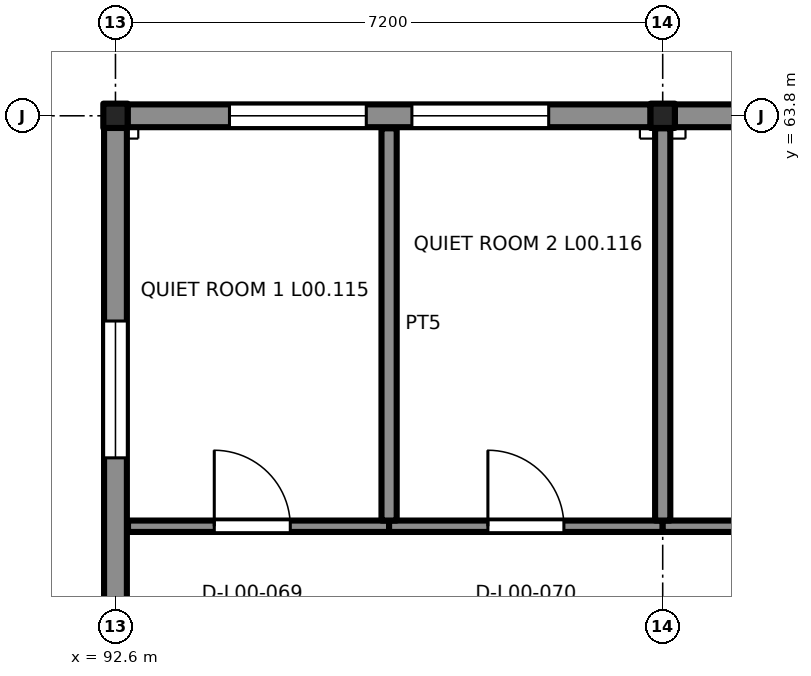
"""IFC4 building model, lengths in metres.
Left out: names, types, materials, properties, quantities, classifications, styles, units other than length and angle.
Written with IfcOpenShell. Run it as: python <this file> out.ifc"""

import sys

from ifc_helpers import new_model, si_unit, direction, frame, frame_2d, origin, origin_2d, place, context, subcontext, project, spatial, rectangle, extrude, element, fill, save


model = new_model("IFC4")
c1 = context("Model", 3, precision=1e-05, world=origin(), true_north=direction((0.0, 1.0)))
c2 = subcontext(c1, "Body", "Model", "MODEL_VIEW")
j1 = project(units=[si_unit("LENGTHUNIT", "METRE"), si_unit("PLANEANGLEUNIT", "RADIAN")], contexts=[c1])
p1 = place(None, origin())
s1 = spatial("IfcSite", under=j1, at=p1, CompositionType="ELEMENT")
p2 = place(p1, origin())
s2 = spatial("IfcBuilding", under=s1, at=p2, CompositionType="ELEMENT")
p3 = place(p2, origin())
s3 = spatial("IfcBuildingStorey", under=s2, at=p3, CompositionType="ELEMENT", Elevation=0.0)
for number, where, z_axis, x_axis in (
    (1, (92.6, 63.8, -0.2), (0.0, 0.0, 1.0), (1.0, 0.0, 0.0)),
    (2, (99.8, 63.8, -0.2), (0.0, 0.0, 1.0), (1.0, 0.0, 0.0)),
):
    element("IfcColumn", number, at=place(p3, frame(where, z_axis=z_axis, x_axis=x_axis)), inside=s3, PredefinedType="COLUMN", context=c2, shape_type="SweptSolid", body=[
        extrude(rectangle(XDim=0.32, YDim=0.32, at=origin_2d()), origin(), (0.0, 0.0, 1.0), 4.3),
    ])
p4 = place(p3, frame((92.76, 63.8, 0.0), z_axis=(0.0, 0.0, 1.0), x_axis=(1.0, 0.0, 0.0)))
e3 = element("IfcWall", 3, at=p4, inside=s3, PredefinedType="SOLIDWALL", context=c2, shape_type="SweptSolid", body=[
    extrude(rectangle(XDim=6.88, YDim=0.33, at=frame_2d((3.44, 0.0))), origin(), (0.0, 0.0, 1.0), 0.45),
])
p5 = place(p3, frame((92.76, 63.8, 0.45), z_axis=(0.0, 0.0, 1.0), x_axis=(1.0, 0.0, 0.0)))
e4 = element("IfcWall", 4, at=p5, inside=s3, PredefinedType="PARTITIONING", context=c2, shape_type="SweptSolid", body=[
    extrude(rectangle(XDim=6.88, YDim=0.3, at=frame_2d((3.44, 0.0))), origin(), (0.0, 0.0, 1.0), 3.35),
])
p6 = place(p5, frame((1.34, 0.0, 0.45)))
e5 = element("IfcOpeningElement", 5, at=p6, cuts=e4, PredefinedType="OPENING", context=c2, shape_type="SweptSolid", body=[
    extrude(rectangle(XDim=1.8, YDim=2.1, at=frame_2d((0.9, 1.05))), frame((0.0, 0.16, 0.0), z_axis=(0.0, -1.0, 0.0), x_axis=(1.0, 0.0, 0.0)), (0.0, 0.0, 1.0), 0.32),
])
p7 = place(p5, frame((3.74, 0.0, 0.45)))
e6 = element("IfcOpeningElement", 6, at=p7, cuts=e4, PredefinedType="OPENING", context=c2, shape_type="SweptSolid", body=[
    extrude(rectangle(XDim=1.8, YDim=2.1, at=frame_2d((0.9, 1.05))), frame((0.0, 0.16, 0.0), z_axis=(0.0, -1.0, 0.0), x_axis=(1.0, 0.0, 0.0)), (0.0, 0.0, 1.0), 0.32),
])
p8 = place(p3, frame((99.96, 63.8, 0.0), z_axis=(0.0, 0.0, 1.0), x_axis=(1.0, 0.0, 0.0)))
e7 = element("IfcWall", 7, at=p8, inside=s3, PredefinedType="SOLIDWALL", context=c2, shape_type="SweptSolid", body=[
    extrude(rectangle(XDim=6.88, YDim=0.33, at=frame_2d((3.44, 0.0))), origin(), (0.0, 0.0, 1.0), 0.45),
])
p9 = place(p3, frame((99.96, 63.8, 0.45), z_axis=(0.0, 0.0, 1.0), x_axis=(1.0, 0.0, 0.0)))
e8 = element("IfcWall", 8, at=p9, inside=s3, PredefinedType="PARTITIONING", context=c2, shape_type="SweptSolid", body=[
    extrude(rectangle(XDim=6.88, YDim=0.3, at=frame_2d((3.44, 0.0))), origin(), (0.0, 0.0, 1.0), 3.35),
])
p10 = place(p9, frame((2.54, 0.0, 0.45)))
e9 = element("IfcOpeningElement", 9, at=p10, cuts=e8, PredefinedType="OPENING", context=c2, shape_type="SweptSolid", body=[
    extrude(rectangle(XDim=1.8, YDim=2.1, at=frame_2d((0.9, 1.05))), frame((0.0, 0.16, 0.0), z_axis=(0.0, -1.0, 0.0), x_axis=(1.0, 0.0, 0.0)), (0.0, 0.0, 1.0), 0.32),
])
p11 = place(p3, frame((92.6, 56.76, 0.0), z_axis=(0.0, 0.0, 1.0), x_axis=(0.0, 1.0, 0.0)))
e10 = element("IfcWall", 10, at=p11, inside=s3, PredefinedType="SOLIDWALL", context=c2, shape_type="SweptSolid", body=[
    extrude(rectangle(XDim=6.88, YDim=0.33, at=frame_2d((3.44, 0.0))), origin(), (0.0, 0.0, 1.0), 0.45),
])
p12 = place(p3, frame((92.6, 56.76, 0.45), z_axis=(0.0, 0.0, 1.0), x_axis=(0.0, 1.0, 0.0)))
e11 = element("IfcWall", 11, at=p12, inside=s3, PredefinedType="PARTITIONING", context=c2, shape_type="SweptSolid", body=[
    extrude(rectangle(XDim=6.88, YDim=0.3, at=frame_2d((3.44, 0.0))), origin(), (0.0, 0.0, 1.0), 3.35),
])
p13 = place(p12, frame((2.54, 0.0, 0.45)))
e12 = element("IfcOpeningElement", 12, at=p13, cuts=e11, PredefinedType="OPENING", context=c2, shape_type="SweptSolid", body=[
    extrude(rectangle(XDim=1.8, YDim=2.1, at=frame_2d((0.9, 1.05))), frame((0.0, 0.16, 0.0), z_axis=(0.0, -1.0, 0.0), x_axis=(1.0, 0.0, 0.0)), (0.0, 0.0, 1.0), 0.32),
])
p14 = place(p3, frame((92.765, 58.4, 0.0), z_axis=(0.0, 0.0, 1.0), x_axis=(1.0, 0.0, 0.0)))
e13 = element("IfcWall", 13, at=p14, inside=s3, PredefinedType="PARTITIONING", context=c2, shape_type="SweptSolid", body=[
    extrude(rectangle(XDim=3.435, YDim=0.15, at=frame_2d((1.718, 0.0))), origin(), (0.0, 0.0, 1.0), 4.382),
])
p15 = place(p14, frame((1.135, 0.0, 0.0)))
e14 = element("IfcOpeningElement", 14, at=p15, cuts=e13, PredefinedType="OPENING", context=c2, shape_type="SweptSolid", body=[
    extrude(rectangle(XDim=1.0, YDim=2.1, at=frame_2d((0.5, 1.05))), frame((0.0, 0.085, 0.0), z_axis=(0.0, -1.0, 0.0), x_axis=(1.0, 0.0, 0.0)), (0.0, 0.0, 1.0), 0.17),
])
p16 = place(p3, frame((96.2, 58.4, 0.0), z_axis=(0.0, 0.0, 1.0), x_axis=(1.0, 0.0, 0.0)))
e15 = element("IfcWall", 15, at=p16, inside=s3, PredefinedType="PARTITIONING", context=c2, shape_type="SweptSolid", body=[
    extrude(rectangle(XDim=3.6, YDim=0.15, at=frame_2d((1.8, 0.0))), origin(), (0.0, 0.0, 1.0), 4.382),
])
p17 = place(p16, frame((1.3, 0.0, 0.0)))
e16 = element("IfcOpeningElement", 16, at=p17, cuts=e15, PredefinedType="OPENING", context=c2, shape_type="SweptSolid", body=[
    extrude(rectangle(XDim=1.0, YDim=2.1, at=frame_2d((0.5, 1.05))), frame((0.0, 0.085, 0.0), z_axis=(0.0, -1.0, 0.0), x_axis=(1.0, 0.0, 0.0)), (0.0, 0.0, 1.0), 0.17),
])
p18 = place(p3, frame((96.2, 63.635, 0.0), z_axis=(0.0, 0.0, 1.0), x_axis=(0.0, -1.0, 0.0)))
e17 = element("IfcWall", 17, at=p18, inside=s3, PredefinedType="PARTITIONING", context=c2, shape_type="SweptSolid", body=[
    extrude(rectangle(XDim=5.16, YDim=0.2, at=frame_2d((2.58, 0.0))), origin(), (0.0, 0.0, 1.0), 4.382),
])
p19 = place(p3, frame((99.8, 58.4, 0.0), z_axis=(0.0, 0.0, 1.0), x_axis=(1.0, 0.0, 0.0)))
e18 = element("IfcWall", 18, at=p19, inside=s3, PredefinedType="PARTITIONING", context=c2, shape_type="SweptSolid", body=[
    extrude(rectangle(XDim=7.2, YDim=0.15, at=frame_2d((3.6, 0.0))), origin(), (0.0, 0.0, 1.0), 4.382),
])
p20 = place(p19, frame((1.3, 0.0, 0.0)))
e19 = element("IfcOpeningElement", 19, at=p20, cuts=e18, PredefinedType="OPENING", context=c2, shape_type="SweptSolid", body=[
    extrude(rectangle(XDim=1.0, YDim=2.1, at=frame_2d((0.5, 1.05))), frame((0.0, 0.085, 0.0), z_axis=(0.0, -1.0, 0.0), x_axis=(1.0, 0.0, 0.0)), (0.0, 0.0, 1.0), 0.17),
])
p21 = place(p3, frame((99.8, 63.635, 0.0), z_axis=(0.0, 0.0, 1.0), x_axis=(0.0, -1.0, 0.0)))
e20 = element("IfcWall", 20, at=p21, inside=s3, PredefinedType="PARTITIONING", context=c2, shape_type="SweptSolid", body=[
    extrude(rectangle(XDim=5.16, YDim=0.2, at=frame_2d((2.58, 0.0))), origin(), (0.0, 0.0, 1.0), 4.382),
])
p22 = place(p6, origin())
e21 = element("IfcWindow", 21, at=p22, inside=s3, PartitioningType="SINGLE_PANEL", PredefinedType="WINDOW", context=c2, shape_type="SweptSolid", body=[
    extrude(rectangle(XDim=1.8, YDim=2.1, at=frame_2d((0.9, 1.05))), frame((0.0, 0.03, 0.0), z_axis=(0.0, -1.0, 0.0), x_axis=(1.0, 0.0, 0.0)), (0.0, 0.0, 1.0), 0.06),
])
fill(e5, e21)
p23 = place(p7, origin())
e22 = element("IfcWindow", 22, at=p23, inside=s3, PartitioningType="SINGLE_PANEL", PredefinedType="WINDOW", context=c2, shape_type="SweptSolid", body=[
    extrude(rectangle(XDim=1.8, YDim=2.1, at=frame_2d((0.9, 1.05))), frame((0.0, 0.03, 0.0), z_axis=(0.0, -1.0, 0.0), x_axis=(1.0, 0.0, 0.0)), (0.0, 0.0, 1.0), 0.06),
])
fill(e6, e22)
p24 = place(p13, origin())
e23 = element("IfcWindow", 23, at=p24, inside=s3, PartitioningType="SINGLE_PANEL", PredefinedType="WINDOW", context=c2, shape_type="SweptSolid", body=[
    extrude(rectangle(XDim=1.8, YDim=2.1, at=frame_2d((0.9, 1.05))), frame((0.0, 0.03, 0.0), z_axis=(0.0, -1.0, 0.0), x_axis=(1.0, 0.0, 0.0)), (0.0, 0.0, 1.0), 0.06),
])
fill(e12, e23)
p25 = place(p15, origin())
e24 = element("IfcDoor", 24, at=p25, inside=s3, OperationType="SINGLE_SWING_LEFT", PredefinedType="DOOR", context=c2, shape_type="SweptSolid", body=[
    extrude(rectangle(XDim=1.0, YDim=2.1, at=frame_2d((0.5, 1.05))), frame((0.0, 0.025, 0.0), z_axis=(0.0, -1.0, 0.0), x_axis=(1.0, 0.0, 0.0)), (0.0, 0.0, 1.0), 0.05),
])
fill(e14, e24)
p26 = place(p17, origin())
e25 = element("IfcDoor", 25, at=p26, inside=s3, OperationType="SINGLE_SWING_RIGHT", PredefinedType="DOOR", context=c2, shape_type="SweptSolid", body=[
    extrude(rectangle(XDim=1.0, YDim=2.1, at=frame_2d((0.5, 1.05))), frame((0.0, 0.025, 0.0), z_axis=(0.0, -1.0, 0.0), x_axis=(1.0, 0.0, 0.0)), (0.0, 0.0, 1.0), 0.05),
])
fill(e16, e25)
save(model, sys.argv[1])
